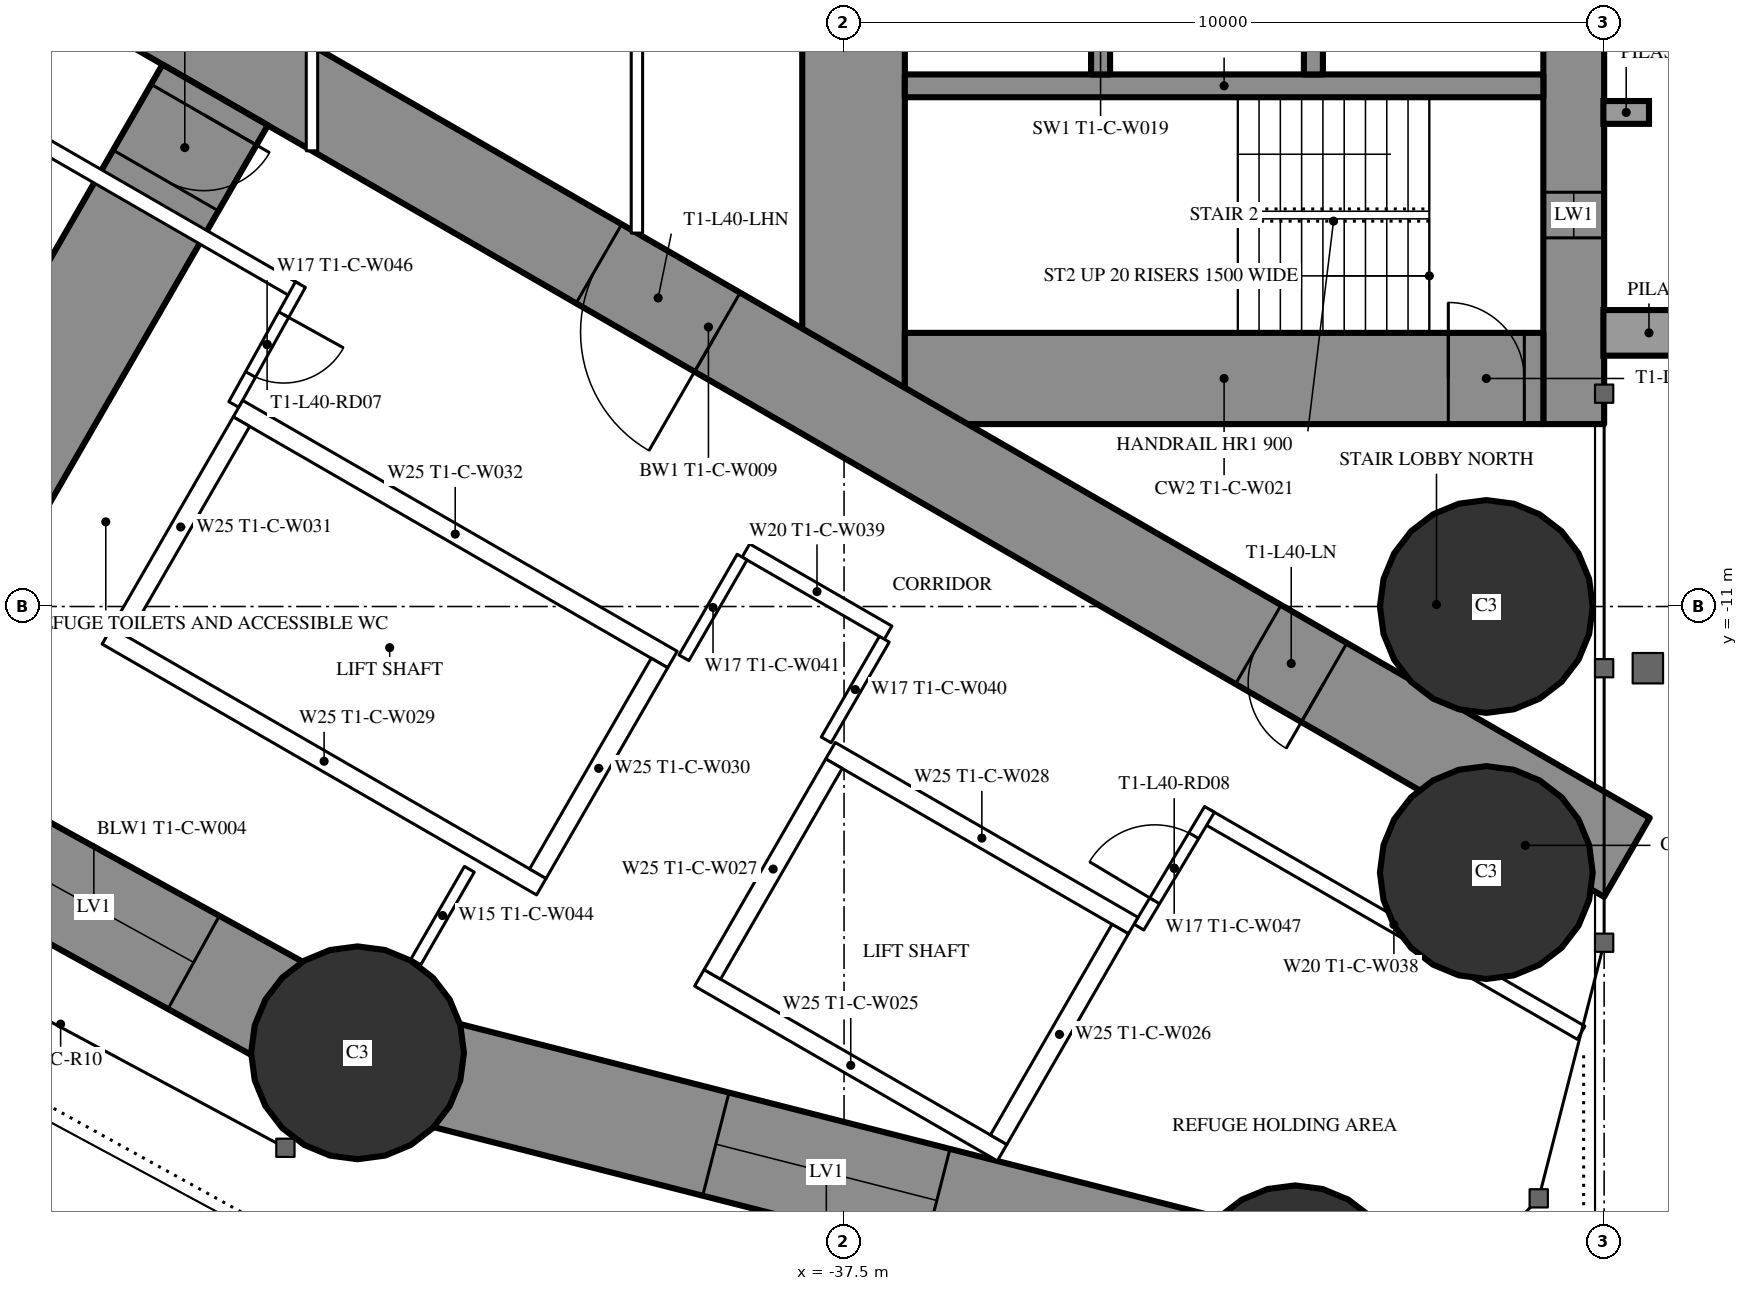
"""IFC4 building model, lengths in metres.
Left out: names, types, materials, properties, quantities, classifications, styles, units other than length and angle.
Written with IfcOpenShell. Run it as: python <this file> out.ifc"""

import sys

from ifc_helpers import new_model, si_unit, direction, frame, frame_2d, origin, origin_2d, place, context, subcontext, project, spatial, rectangle, circle, extrude, element, fill, save


model = new_model("IFC4")
c1 = context("Model", 3, precision=1e-05, world=origin(), true_north=direction((0.0, 1.0)))
c2 = subcontext(c1, "Body", "Model", "MODEL_VIEW")
j1 = project(units=[si_unit("LENGTHUNIT", "METRE"), si_unit("PLANEANGLEUNIT", "RADIAN")], contexts=[c1])
p1 = place(None, origin())
s1 = spatial("IfcSite", under=j1, at=p1, CompositionType="ELEMENT")
p2 = place(p1, origin())
s2 = spatial("IfcBuilding", under=s1, at=p2, CompositionType="ELEMENT")
p3 = place(p2, frame((0.0, 0.0, 152.7)))
s3 = spatial("IfcBuildingStorey", under=s2, at=p3, CompositionType="ELEMENT", Elevation=152.7)
for number, where, z_axis, x_axis in (
    (1, (-31.565, -20.016, 0.0), (0.0, 0.0, 1.0), (1.0, 0.0, 0.0)),
    (2, (-29.05, -11.0, 0.0), (0.0, 0.0, 1.0), (1.0, 0.0, 0.0)),
    (3, (-29.05, -14.5, 0.0), (0.0, 0.0, 1.0), (1.0, 0.0, 0.0)),
    (4, (-43.9, -16.871, 0.0), (0.0, 0.0, 1.0), (1.0, 0.0, 0.0)),
):
    element("IfcColumn", number, at=place(p3, frame(where, z_axis=z_axis, x_axis=x_axis)), inside=s3, PredefinedType="COLUMN", context=c2, shape_type="SweptSolid", body=[
        extrude(circle(Radius=1.4, at=origin_2d()), origin(), (0.0, 0.0, 1.0), 3.6),
    ])
p4 = place(p3, frame((-27.9, 8.6, 0.0), z_axis=(0.0, 0.0, 1.0), x_axis=(0.0, -1.0, 0.0)))
e5 = element("IfcWall", 5, at=p4, inside=s3, PredefinedType="SHEAR", context=c2, shape_type="SweptSolid", body=[
    extrude(rectangle(XDim=17.2, YDim=0.8, at=frame_2d((8.6, 0.0))), origin(), (0.0, 0.0, 1.0), 3.6),
])
p5 = place(p4, frame((2.45, 0.0, 0.6)))
e6 = element("IfcOpeningElement", 6, at=p5, cuts=e5, PredefinedType="OPENING", context=c2, shape_type="SweptSolid", body=[
    extrude(rectangle(XDim=0.6, YDim=2.1, at=frame_2d((0.3, 1.05))), frame((0.0, 0.41, 0.0), z_axis=(0.0, -1.0, 0.0), x_axis=(1.0, 0.0, 0.0)), (0.0, 0.0, 1.0), 0.82),
])
p6 = place(p4, frame((14.15, 0.0, 0.6)))
e7 = element("IfcOpeningElement", 7, at=p6, cuts=e5, PredefinedType="OPENING", context=c2, shape_type="SweptSolid", body=[
    extrude(rectangle(XDim=0.6, YDim=2.1, at=frame_2d((0.3, 1.05))), frame((0.0, 0.41, 0.0), z_axis=(0.0, -1.0, 0.0), x_axis=(1.0, 0.0, 0.0)), (0.0, 0.0, 1.0), 0.82),
])
p7 = place(p3, frame((-37.375, 8.6, 0.0), z_axis=(0.0, 0.0, 1.0), x_axis=(0.0, -1.0, 0.0)))
e8 = element("IfcWall", 8, at=p7, inside=s3, PredefinedType="SHEAR", context=c2, shape_type="SweptSolid", body=[
    extrude(rectangle(XDim=17.2, YDim=1.35, at=frame_2d((8.6, 0.0))), origin(), (0.0, 0.0, 1.0), 3.6),
])
p8 = place(p7, frame((7.7, 0.0, 0.0)))
e9 = element("IfcOpeningElement", 9, at=p8, cuts=e8, PredefinedType="OPENING", context=c2, shape_type="SweptSolid", body=[
    extrude(rectangle(XDim=1.8, YDim=2.2, at=frame_2d((0.9, 1.1))), frame((0.0, 0.685, 0.0), z_axis=(0.0, -1.0, 0.0), x_axis=(1.0, 0.0, 0.0)), (0.0, 0.0, 1.0), 1.37),
])
p9 = place(p3, frame((-28.3, -8.0, 0.0), z_axis=(0.0, 0.0, 1.0), x_axis=(-1.0, 0.0, 0.0)))
e10 = element("IfcWall", 10, at=p9, inside=s3, PredefinedType="SHEAR", context=c2, shape_type="SweptSolid", body=[
    extrude(rectangle(XDim=8.4, YDim=1.2, at=frame_2d((4.2, 0.0))), origin(), (0.0, 0.0, 1.0), 3.6),
])
p10 = place(p9, frame((0.25, 0.0, 0.0)))
e11 = element("IfcOpeningElement", 11, at=p10, cuts=e10, PredefinedType="OPENING", context=c2, shape_type="SweptSolid", body=[
    extrude(rectangle(XDim=1.0, YDim=2.2, at=frame_2d((0.5, 1.1))), frame((0.0, 0.61, 0.0), z_axis=(0.0, -1.0, 0.0), x_axis=(1.0, 0.0, 0.0)), (0.0, 0.0, 1.0), 1.22),
])
p11 = place(p3, frame((-28.3, -4.15, 0.0), z_axis=(0.0, 0.0, 1.0), x_axis=(-1.0, 0.0, 0.0)))
e12 = element("IfcWall", 12, at=p11, inside=s3, PredefinedType="SHEAR", context=c2, shape_type="SweptSolid", body=[
    extrude(rectangle(XDim=8.4, YDim=0.3, at=frame_2d((4.2, 0.0))), origin(), (0.0, 0.0, 1.0), 3.6),
])
p12 = place(p3, frame((-31.325, -1.9, 0.0), z_axis=(0.0, 0.0, 1.0), x_axis=(0.0, -1.0, 0.0)))
e13 = element("IfcWall", 13, at=p12, inside=s3, PredefinedType="SHEAR", context=c2, shape_type="SweptSolid", body=[
    extrude(rectangle(XDim=2.1, YDim=0.25, at=frame_2d((1.05, 0.0))), origin(), (0.0, 0.0, 1.0), 3.6),
])
p13 = place(p12, frame((0.5, 0.0, 0.0)))
e14 = element("IfcOpeningElement", 14, at=p13, cuts=e13, PredefinedType="OPENING", context=c2, shape_type="SweptSolid", body=[
    extrude(rectangle(XDim=1.1, YDim=2.2, at=frame_2d((0.55, 1.1))), frame((0.0, 0.135, 0.0), z_axis=(0.0, -1.0, 0.0), x_axis=(1.0, 0.0, 0.0)), (0.0, 0.0, 1.0), 0.27),
])
p14 = place(p3, frame((-34.125, -1.65, 0.0), z_axis=(0.0, 0.0, 1.0), x_axis=(0.0, -1.0, 0.0)))
e15 = element("IfcWall", 15, at=p14, inside=s3, PredefinedType="SHEAR", context=c2, shape_type="SweptSolid", body=[
    extrude(rectangle(XDim=2.35, YDim=0.25, at=frame_2d((1.175, 0.0))), origin(), (0.0, 0.0, 1.0), 3.6),
])
p15 = place(p14, frame((0.875, 0.0, 0.0)))
e16 = element("IfcOpeningElement", 16, at=p15, cuts=e15, PredefinedType="OPENING", context=c2, shape_type="SweptSolid", body=[
    extrude(rectangle(XDim=0.6, YDim=2.0, at=frame_2d((0.3, 1.0))), frame((0.0, 0.135, 0.0), z_axis=(0.0, -1.0, 0.0), x_axis=(1.0, 0.0, 0.0)), (0.0, 0.0, 1.0), 0.27),
])
p16 = place(p3, frame((-27.2, -14.3, 0.0), z_axis=(0.0, 0.0, 1.0), x_axis=(-0.866024021859, 0.500002393557, 0.0)))
e17 = element("IfcWall", 17, at=p16, inside=s3, PredefinedType="SHEAR", context=c2, shape_type="SweptSolid", body=[
    extrude(rectangle(XDim=27.907, YDim=1.2, at=frame_2d((13.954, 0.0))), origin(), (0.0, 0.0, 1.0), 3.6),
])
p17 = place(p16, frame((4.6, 0.0, 0.0)))
e18 = element("IfcOpeningElement", 18, at=p17, cuts=e17, PredefinedType="OPENING", context=c2, shape_type="SweptSolid", body=[
    extrude(rectangle(XDim=1.0, YDim=2.2, at=frame_2d((0.5, 1.1))), frame((0.0, 0.61, 0.0), z_axis=(0.0, -1.0, 0.0), x_axis=(1.0, 0.0, 0.0)), (0.0, 0.0, 1.0), 1.22),
])
p18 = place(p16, frame((13.818, 0.0, 0.0)))
e19 = element("IfcOpeningElement", 19, at=p18, cuts=e17, PredefinedType="OPENING", context=c2, shape_type="SweptSolid", body=[
    extrude(rectangle(XDim=1.8, YDim=2.2, at=frame_2d((0.9, 1.1))), frame((0.0, 0.61, 0.0), z_axis=(0.0, -1.0, 0.0), x_axis=(1.0, 0.0, 0.0)), (0.0, 0.0, 1.0), 1.22),
])
p19 = place(p3, frame((-45.773, -4.27, 0.0), z_axis=(0.0, 0.0, 1.0), x_axis=(-0.499995723283, -0.866027872934, 0.0)))
e20 = element("IfcWall", 20, at=p19, inside=s3, PredefinedType="SHEAR", context=c2, shape_type="SweptSolid", body=[
    extrude(rectangle(XDim=10.131, YDim=1.6, at=frame_2d((5.065, 0.0))), origin(), (0.0, 0.0, 1.0), 3.6),
])
p20 = place(p19, frame((0.3, 0.0, 0.0)))
e21 = element("IfcOpeningElement", 21, at=p20, cuts=e20, PredefinedType="OPENING", context=c2, shape_type="SweptSolid", body=[
    extrude(rectangle(XDim=1.0, YDim=2.2, at=frame_2d((0.5, 1.1))), frame((0.0, 0.81, 0.0), z_axis=(0.0, -1.0, 0.0), x_axis=(1.0, 0.0, 0.0)), (0.0, 0.0, 1.0), 1.62),
])
p21 = place(p3, frame((-50.839, -13.043, 0.0), z_axis=(0.0, 0.0, 1.0), x_axis=(0.875577684027, -0.483077342911, 0.0)))
e22 = element("IfcWall", 22, at=p21, inside=s3, PredefinedType="SHEAR", context=c2, shape_type="SweptSolid", body=[
    extrude(rectangle(XDim=7.925, YDim=1.4, at=frame_2d((3.962, 0.0))), origin(), (0.0, 0.0, 1.0), 3.6),
])
p22 = place(p21, frame((2.462, 0.0, 0.6)))
e23 = element("IfcOpeningElement", 23, at=p22, cuts=e22, PredefinedType="OPENING", context=c2, shape_type="SweptSolid", body=[
    extrude(rectangle(XDim=3.0, YDim=1.2, at=frame_2d((1.5, 0.6))), frame((0.0, 0.71, 0.0), z_axis=(0.0, -1.0, 0.0), x_axis=(1.0, 0.0, 0.0)), (0.0, 0.0, 1.0), 1.42),
])
p23 = place(p3, frame((-43.9, -16.871, 0.0), z_axis=(0.0, 0.0, 1.0), x_axis=(0.969008414312, -0.247027717052, 0.0)))
e24 = element("IfcWall", 24, at=p23, inside=s3, PredefinedType="SHEAR", context=c2, shape_type="SweptSolid", body=[
    extrude(rectangle(XDim=12.729, YDim=1.4, at=frame_2d((6.365, 0.0))), origin(), (0.0, 0.0, 1.0), 3.6),
])
p24 = place(p23, frame((4.865, 0.0, 0.6)))
e25 = element("IfcOpeningElement", 25, at=p24, cuts=e24, PredefinedType="OPENING", context=c2, shape_type="SweptSolid", body=[
    extrude(rectangle(XDim=3.0, YDim=1.2, at=frame_2d((1.5, 0.6))), frame((0.0, 0.71, 0.0), z_axis=(0.0, -1.0, 0.0), x_axis=(1.0, 0.0, 0.0)), (0.0, 0.0, 1.0), 1.42),
])
p25 = place(p3, frame((-42.429, -14.457, 0.0), z_axis=(0.0, 0.0, 1.0), x_axis=(-0.5000578829, -0.865991982497, 0.0)))
e26 = element("IfcWall", 26, at=p25, inside=s3, PredefinedType="PARTITIONING", context=c2, shape_type="SweptSolid", body=[
    extrude(rectangle(XDim=1.407, YDim=0.15, at=frame_2d((0.704, 0.0))), origin(), (0.0, 0.0, 1.0), 3.35),
])
p26 = place(p3, frame((-27.803, -16.608, 0.0), z_axis=(0.0, 0.0, 1.0), x_axis=(-0.866021198669, 0.500007283403, 0.0)))
e27 = element("IfcWall", 27, at=p26, inside=s3, PredefinedType="PARTITIONING", context=c2, shape_type="SweptSolid", body=[
    extrude(rectangle(XDim=5.688, YDim=0.2, at=frame_2d((2.844, 0.0))), origin(), (0.0, 0.0, 1.0), 3.35),
])
p27 = place(p3, frame((-36.92, -11.344, 0.0), z_axis=(0.0, 0.0, 1.0), x_axis=(-0.866065156741, 0.499931139538, 0.0)))
e28 = element("IfcWall", 28, at=p27, inside=s3, PredefinedType="PARTITIONING", context=c2, shape_type="SweptSolid", body=[
    extrude(rectangle(XDim=2.16, YDim=0.2, at=frame_2d((1.08, 0.0))), origin(), (0.0, 0.0, 1.0), 3.35),
])
p28 = place(p3, frame((-44.715, -6.844, 0.0), z_axis=(0.0, 0.0, 1.0), x_axis=(-0.866025261224, 0.500000246922, 0.0)))
e29 = element("IfcWall", 29, at=p28, inside=s3, PredefinedType="PARTITIONING", context=c2, shape_type="SweptSolid", body=[
    extrude(rectangle(XDim=13.567, YDim=0.2, at=frame_2d((6.783, 0.0))), origin(), (0.0, 0.0, 1.0), 3.35),
])
p29 = place(p28, frame((6.719, 0.0, 0.0)))
e30 = element("IfcOpeningElement", 30, at=p29, cuts=e29, PredefinedType="OPENING", context=c2, shape_type="SweptSolid", body=[
    extrude(rectangle(XDim=1.8, YDim=2.2, at=frame_2d((0.9, 1.1))), frame((0.0, 0.11, 0.0), z_axis=(0.0, -1.0, 0.0), x_axis=(1.0, 0.0, 0.0)), (0.0, 0.0, 1.0), 0.22),
])
p30 = place(p3, frame((-44.652, -6.764, 0.0), z_axis=(0.0, 0.0, 1.0), x_axis=(-0.485528096672, -0.8742210632, 0.0)))
e31 = element("IfcWall", 31, at=p30, inside=s3, PredefinedType="PARTITIONING", context=c2, shape_type="SweptSolid", body=[
    extrude(rectangle(XDim=1.805, YDim=0.15, at=frame_2d((0.903, 0.0))), origin(), (0.0, 0.0, 1.0), 3.35),
])
p31 = place(p30, frame((0.453, 0.0, 0.0)))
e32 = element("IfcOpeningElement", 32, at=p31, cuts=e31, PredefinedType="OPENING", context=c2, shape_type="SweptSolid", body=[
    extrude(rectangle(XDim=0.9, YDim=2.04, at=frame_2d((0.45, 1.02))), frame((0.0, 0.085, 0.0), z_axis=(0.0, -1.0, 0.0), x_axis=(1.0, 0.0, 0.0)), (0.0, 0.0, 1.0), 0.17),
])
p32 = place(p3, frame((-33.621, -15.218, 0.0), z_axis=(0.0, 0.0, 1.0), x_axis=(0.514336634837, 0.857588377991, 0.0)))
e33 = element("IfcWall", 33, at=p32, inside=s3, PredefinedType="PARTITIONING", context=c2, shape_type="SweptSolid", body=[
    extrude(rectangle(XDim=1.805, YDim=0.15, at=frame_2d((0.903, 0.0))), origin(), (0.0, 0.0, 1.0), 3.35),
])
p33 = place(p32, frame((0.403, 0.0, 0.0)))
e34 = element("IfcOpeningElement", 34, at=p33, cuts=e33, PredefinedType="OPENING", context=c2, shape_type="SweptSolid", body=[
    extrude(rectangle(XDim=1.0, YDim=2.04, at=frame_2d((0.5, 1.02))), frame((0.0, 0.085, 0.0), z_axis=(0.0, -1.0, 0.0), x_axis=(1.0, 0.0, 0.0)), (0.0, 0.0, 1.0), 0.17),
])
p34 = place(p3, frame((-36.97, -11.43, 0.0), z_axis=(0.0, 0.0, 1.0), x_axis=(-0.499985008713, -0.866034058835, 0.0)))
e35 = element("IfcWall", 35, at=p34, inside=s3, PredefinedType="PARTITIONING", context=c2, shape_type="SweptSolid", body=[
    extrude(rectangle(XDim=1.529, YDim=0.15, at=frame_2d((0.765, 0.0))), origin(), (0.0, 0.0, 1.0), 3.35),
])
p35 = place(p3, frame((-38.841, -10.35, 0.0), z_axis=(0.0, 0.0, 1.0), x_axis=(-0.499966498333, -0.866044745117, 0.0)))
e36 = element("IfcWall", 36, at=p35, inside=s3, PredefinedType="PARTITIONING", context=c2, shape_type="SweptSolid", body=[
    extrude(rectangle(XDim=1.53, YDim=0.15, at=frame_2d((0.765, 0.0))), origin(), (0.0, 0.0, 1.0), 3.35),
])
p36 = place(p3, frame((-40.225, 6.087, 0.0), z_axis=(0.0, 0.0, 1.0), x_axis=(0.0, -1.0, 0.0)))
e37 = element("IfcWall", 37, at=p36, inside=s3, PredefinedType="PARTITIONING", context=c2, shape_type="SweptSolid", body=[
    extrude(rectangle(XDim=12.174, YDim=0.15, at=frame_2d((6.087, 0.0))), origin(), (0.0, 0.0, 1.0), 3.35),
])
p37 = place(p36, frame((5.187, 0.0, 0.0)))
e38 = element("IfcOpeningElement", 38, at=p37, cuts=e37, PredefinedType="OPENING", context=c2, shape_type="SweptSolid", body=[
    extrude(rectangle(XDim=1.8, YDim=2.2, at=frame_2d((0.9, 1.1))), frame((0.0, 0.085, 0.0), z_axis=(0.0, -1.0, 0.0), x_axis=(1.0, 0.0, 0.0)), (0.0, 0.0, 1.0), 0.17),
])
p38 = place(p3, frame((-44.5, 5.005, 0.0), z_axis=(0.0, 0.0, 1.0), x_axis=(0.0, -1.0, 0.0)))
e39 = element("IfcWall", 39, at=p38, inside=s3, PredefinedType="PARTITIONING", context=c2, shape_type="SweptSolid", body=[
    extrude(rectangle(XDim=10.009, YDim=0.15, at=frame_2d((5.005, 0.0))), origin(), (0.0, 0.0, 1.0), 3.35),
])
p39 = place(p38, frame((4.505, 0.0, 0.0)))
e40 = element("IfcOpeningElement", 40, at=p39, cuts=e39, PredefinedType="OPENING", context=c2, shape_type="SweptSolid", body=[
    extrude(rectangle(XDim=1.0, YDim=2.2, at=frame_2d((0.5, 1.1))), frame((0.0, 0.085, 0.0), z_axis=(0.0, -1.0, 0.0), x_axis=(1.0, 0.0, 0.0)), (0.0, 0.0, 1.0), 0.17),
])
p40 = place(p3, frame((-33.696, -15.197, 0.0), z_axis=(0.0, 0.0, 1.0), x_axis=(-0.865976953817, 0.500083908417, 0.0)))
e41 = element("IfcWall", 41, at=p40, inside=s3, PredefinedType="PARTITIONING", context=c2, shape_type="SweptSolid", body=[
    extrude(rectangle(XDim=4.599, YDim=0.25, at=frame_2d((2.3, 0.0))), origin(), (0.0, 0.0, 1.0), 3.35),
])
p41 = place(p3, frame((-35.42, -18.186, 0.0), z_axis=(0.0, 0.0, 1.0), x_axis=(-0.865990227814, 0.50006092162, 0.0)))
e42 = element("IfcWall", 42, at=p41, inside=s3, PredefinedType="PARTITIONING", context=c2, shape_type="SweptSolid", body=[
    extrude(rectangle(XDim=4.6, YDim=0.25, at=frame_2d((2.3, 0.0))), origin(), (0.0, 0.0, 1.0), 3.35),
])
p42 = place(p3, frame((-33.866, -15.243, 0.0), z_axis=(0.0, 0.0, 1.0), x_axis=(-0.499929347863, -0.866066190972, 0.0)))
e43 = element("IfcWall", 43, at=p42, inside=s3, PredefinedType="PARTITIONING", context=c2, shape_type="SweptSolid", body=[
    extrude(rectangle(XDim=3.201, YDim=0.25, at=frame_2d((1.6, 0.0))), origin(), (0.0, 0.0, 1.0), 3.35),
])
p43 = place(p3, frame((-37.633, -13.068, 0.0), z_axis=(0.0, 0.0, 1.0), x_axis=(-0.499872130319, -0.866099216793, 0.0)))
e44 = element("IfcWall", 44, at=p43, inside=s3, PredefinedType="PARTITIONING", context=c2, shape_type="SweptSolid", body=[
    extrude(rectangle(XDim=3.2, YDim=0.25, at=frame_2d((1.6, 0.0))), origin(), (0.0, 0.0, 1.0), 3.35),
])
p44 = place(p3, frame((-39.758, -11.697, 0.0), z_axis=(0.0, 0.0, 1.0), x_axis=(-0.866024194504, 0.500002094529, 0.0)))
e45 = element("IfcWall", 45, at=p44, inside=s3, PredefinedType="PARTITIONING", context=c2, shape_type="SweptSolid", body=[
    extrude(rectangle(XDim=6.6, YDim=0.25, at=frame_2d((3.3, 0.0))), origin(), (0.0, 0.0, 1.0), 3.35),
])
p45 = place(p3, frame((-41.482, -14.686, 0.0), z_axis=(0.0, 0.0, 1.0), x_axis=(-0.86603344179, 0.499986077507, 0.0)))
e46 = element("IfcWall", 46, at=p45, inside=s3, PredefinedType="PARTITIONING", context=c2, shape_type="SweptSolid", body=[
    extrude(rectangle(XDim=6.6, YDim=0.25, at=frame_2d((3.3, 0.0))), origin(), (0.0, 0.0, 1.0), 3.35),
])
for number, where, z_axis, x_axis in (
    (47, (-39.928, -11.743, 0.0), (0.0, 0.0, 1.0), (-0.5, -0.866, 0.0)),
    (48, (-45.428, -8.568, 0.0), (0.0, 0.0, 1.0), (-0.5, -0.866, 0.0)),
):
    element("IfcWall", number, at=place(p3, frame(where, z_axis=z_axis, x_axis=x_axis)), inside=s3, PredefinedType="PARTITIONING", context=c2, shape_type="SweptSolid", body=[
        extrude(rectangle(XDim=3.201, YDim=0.25, at=frame_2d((1.6, 0.0))), origin(), (0.0, 0.0, 1.0), 3.35),
    ])
p46 = place(p22, origin())
e49 = element("IfcWindow", 49, at=p46, inside=s3, PartitioningType="SINGLE_PANEL", PredefinedType="WINDOW", context=c2, shape_type="SweptSolid", body=[
    extrude(rectangle(XDim=3.0, YDim=1.2, at=frame_2d((1.5, 0.6))), frame((0.0, 0.03, 0.0), z_axis=(0.0, -1.0, 0.0), x_axis=(1.0, 0.0, 0.0)), (0.0, 0.0, 1.0), 0.06),
])
fill(e23, e49)
p47 = place(p24, origin())
e50 = element("IfcWindow", 50, at=p47, inside=s3, PartitioningType="SINGLE_PANEL", PredefinedType="WINDOW", context=c2, shape_type="SweptSolid", body=[
    extrude(rectangle(XDim=3.0, YDim=1.2, at=frame_2d((1.5, 0.6))), frame((0.0, 0.03, 0.0), z_axis=(0.0, -1.0, 0.0), x_axis=(1.0, 0.0, 0.0)), (0.0, 0.0, 1.0), 0.06),
])
fill(e25, e50)
p48 = place(p20, origin())
e51 = element("IfcDoor", 51, at=p48, inside=s3, OperationType="SINGLE_SWING_LEFT", PredefinedType="DOOR", context=c2, shape_type="SweptSolid", body=[
    extrude(rectangle(XDim=1.0, YDim=2.2, at=frame_2d((0.5, 1.1))), frame((0.0, 0.025, 0.0), z_axis=(0.0, -1.0, 0.0), x_axis=(1.0, 0.0, 0.0)), (0.0, 0.0, 1.0), 0.05),
])
fill(e21, e51)
p49 = place(p31, origin())
e52 = element("IfcDoor", 52, at=p49, inside=s3, OperationType="SINGLE_SWING_LEFT", PredefinedType="DOOR", context=c2, shape_type="SweptSolid", body=[
    extrude(rectangle(XDim=0.9, YDim=2.04, at=frame_2d((0.45, 1.02))), frame((0.0, 0.025, 0.0), z_axis=(0.0, -1.0, 0.0), x_axis=(1.0, 0.0, 0.0)), (0.0, 0.0, 1.0), 0.05),
])
fill(e32, e52)
p50 = place(p33, origin())
e53 = element("IfcDoor", 53, at=p50, inside=s3, OperationType="SINGLE_SWING_LEFT", PredefinedType="DOOR", context=c2, shape_type="SweptSolid", body=[
    extrude(rectangle(XDim=1.0, YDim=2.04, at=frame_2d((0.5, 1.02))), frame((0.0, 0.025, 0.0), z_axis=(0.0, -1.0, 0.0), x_axis=(1.0, 0.0, 0.0)), (0.0, 0.0, 1.0), 0.05),
])
fill(e34, e53)
p51 = place(p17, origin())
e54 = element("IfcDoor", 54, at=p51, inside=s3, OperationType="SINGLE_SWING_LEFT", PredefinedType="DOOR", context=c2, shape_type="SweptSolid", body=[
    extrude(rectangle(XDim=1.0, YDim=2.2, at=frame_2d((0.5, 1.1))), frame((0.0, 0.025, 0.0), z_axis=(0.0, -1.0, 0.0), x_axis=(1.0, 0.0, 0.0)), (0.0, 0.0, 1.0), 0.05),
])
fill(e18, e54)
p52 = place(p18, origin())
e55 = element("IfcDoor", 55, at=p52, inside=s3, OperationType="DOUBLE_DOOR_SINGLE_SWING", PredefinedType="DOOR", context=c2, shape_type="SweptSolid", body=[
    extrude(rectangle(XDim=1.8, YDim=2.2, at=frame_2d((0.9, 1.1))), frame((0.0, 0.025, 0.0), z_axis=(0.0, -1.0, 0.0), x_axis=(1.0, 0.0, 0.0)), (0.0, 0.0, 1.0), 0.05),
])
fill(e19, e55)
p53 = place(p10, origin())
e56 = element("IfcDoor", 56, at=p53, inside=s3, OperationType="SINGLE_SWING_RIGHT", PredefinedType="DOOR", context=c2, shape_type="SweptSolid", body=[
    extrude(rectangle(XDim=1.0, YDim=2.2, at=frame_2d((0.5, 1.1))), frame((0.0, 0.025, 0.0), z_axis=(0.0, -1.0, 0.0), x_axis=(1.0, 0.0, 0.0)), (0.0, 0.0, 1.0), 0.05),
])
fill(e11, e56)
p54 = place(p6, origin())
e57 = element("IfcWindow", 57, at=p54, inside=s3, PartitioningType="SINGLE_PANEL", PredefinedType="WINDOW", context=c2, shape_type="SweptSolid", body=[
    extrude(rectangle(XDim=0.6, YDim=2.1, at=frame_2d((0.3, 1.05))), frame((0.0, 0.03, 0.0), z_axis=(0.0, -1.0, 0.0), x_axis=(1.0, 0.0, 0.0)), (0.0, 0.0, 1.0), 0.06),
])
fill(e7, e57)
save(model, sys.argv[1])
